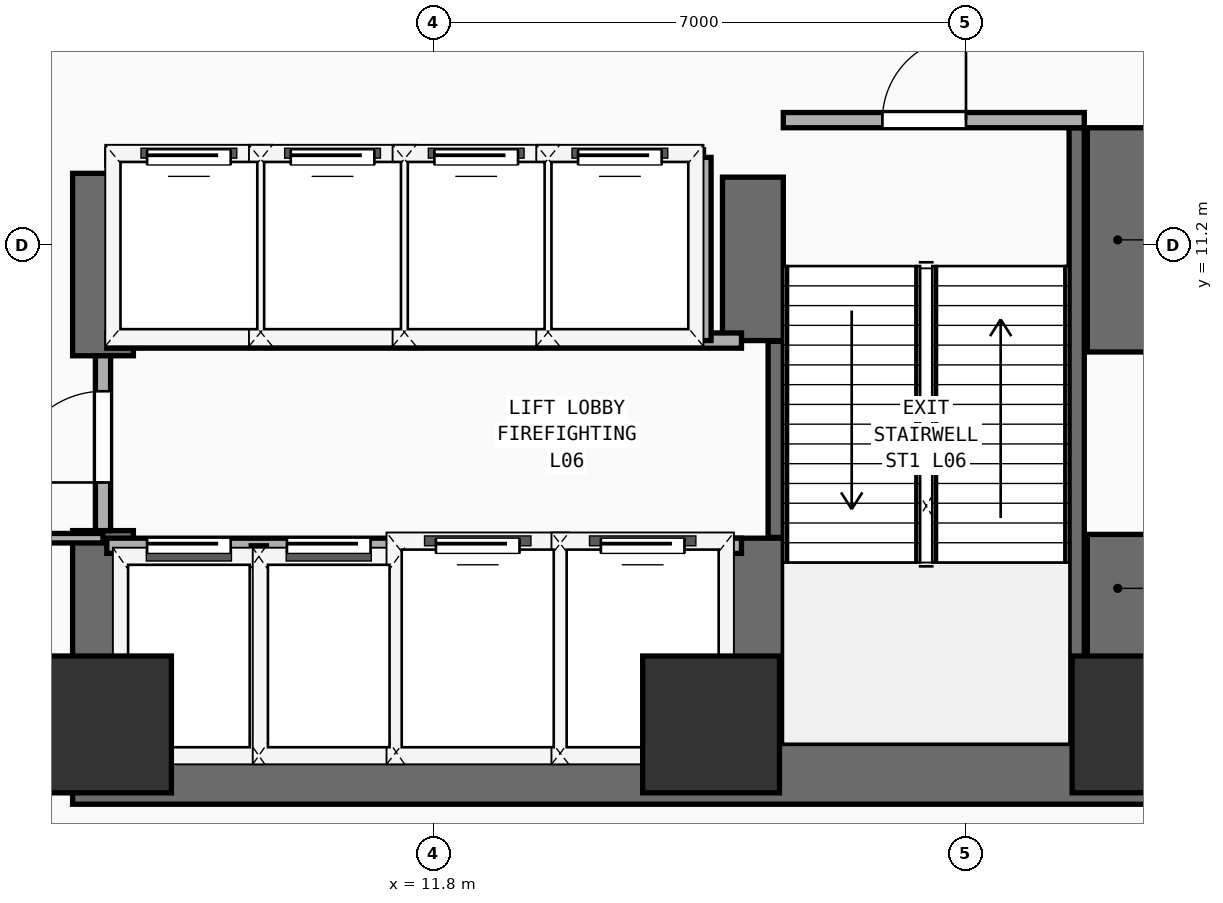
"""IFC4 building model, lengths in metres.
Left out: names, types, materials, properties, quantities, classifications, styles, units other than length and angle.
Written with IfcOpenShell. Run it as: python <this file> out.ifc"""

import sys

from ifc_helpers import new_model, si_unit, direction, frame, frame_2d, origin, origin_2d, place, context, subcontext, project, spatial, rectangle, extrude, element, fill, save


model = new_model("IFC4")
c1 = context("Model", 3, precision=1e-05, world=origin(), true_north=direction((0.0, 1.0)))
c2 = subcontext(c1, "Body", "Model", "MODEL_VIEW")
j1 = project(units=[si_unit("LENGTHUNIT", "METRE"), si_unit("PLANEANGLEUNIT", "RADIAN")], contexts=[c1])
p1 = place(None, origin())
s1 = spatial("IfcSite", under=j1, at=p1, CompositionType="ELEMENT")
p2 = place(p1, origin())
s2 = spatial("IfcBuilding", under=s1, at=p2, CompositionType="ELEMENT")
p3 = place(p2, frame((0.0, 0.0, 24.8)))
s3 = spatial("IfcBuildingStorey", under=s2, at=p3, CompositionType="ELEMENT", Elevation=24.8)
p4 = place(p3, frame((7.05, 4.25, 0.0), z_axis=(0.0, 0.0, 1.0), x_axis=(1.0, 0.0, 0.0)))
e1 = element("IfcWall", 1, at=p4, inside=s3, PredefinedType="SHEAR", context=c2, shape_type="SweptSolid", body=[
    extrude(rectangle(XDim=14.15, YDim=0.8, at=frame_2d((7.075, 0.0))), origin(), (0.0, 0.0, 1.0), 4.35),
])
p5 = place(p3, frame((7.45, 4.65, 0.0), z_axis=(0.0, 0.0, 1.0), x_axis=(0.0, 1.0, 0.0)))
e2 = element("IfcWall", 2, at=p5, inside=s3, PredefinedType="SHEAR", context=c2, shape_type="SweptSolid", body=[
    extrude(rectangle(XDim=2.8, YDim=0.8, at=frame_2d((1.4, 0.0))), origin(), (0.0, 0.0, 1.0), 4.35),
])
p6 = place(p3, frame((7.45, 9.75, 0.0), z_axis=(0.0, 0.0, 1.0), x_axis=(0.0, 1.0, 0.0)))
e3 = element("IfcWall", 3, at=p6, inside=s3, PredefinedType="SHEAR", context=c2, shape_type="SweptSolid", body=[
    extrude(rectangle(XDim=2.4, YDim=0.8, at=frame_2d((1.2, 0.0))), origin(), (0.0, 0.0, 1.0), 4.35),
])
p7 = place(p3, frame((20.8, 4.65, 0.0), z_axis=(0.0, 0.0, 1.0), x_axis=(0.0, 1.0, 0.0)))
e4 = element("IfcWall", 4, at=p7, inside=s3, PredefinedType="SHEAR", context=c2, shape_type="SweptSolid", body=[
    extrude(rectangle(XDim=2.75, YDim=0.8, at=frame_2d((1.375, 0.0))), origin(), (0.0, 0.0, 1.0), 4.35),
])
p8 = place(p3, frame((20.8, 9.8, 0.0), z_axis=(0.0, 0.0, 1.0), x_axis=(0.0, 1.0, 0.0)))
e5 = element("IfcWall", 5, at=p8, inside=s3, PredefinedType="SHEAR", context=c2, shape_type="SweptSolid", body=[
    extrude(rectangle(XDim=2.95, YDim=0.8, at=frame_2d((1.475, 0.0))), origin(), (0.0, 0.0, 1.0), 4.35),
])
p9 = place(p3, frame((16.0, 4.65, 0.0), z_axis=(0.0, 0.0, 1.0), x_axis=(0.0, 1.0, 0.0)))
e6 = element("IfcWall", 6, at=p9, inside=s3, PredefinedType="SHEAR", context=c2, shape_type="SweptSolid", body=[
    extrude(rectangle(XDim=2.7, YDim=0.8, at=frame_2d((1.35, 0.0))), origin(), (0.0, 0.0, 1.0), 4.35),
])
p10 = place(p3, frame((16.0, 9.95, 0.0), z_axis=(0.0, 0.0, 1.0), x_axis=(0.0, 1.0, 0.0)))
e7 = element("IfcWall", 7, at=p10, inside=s3, PredefinedType="SHEAR", context=c2, shape_type="SweptSolid", body=[
    extrude(rectangle(XDim=2.15, YDim=0.8, at=frame_2d((1.075, 0.0))), origin(), (0.0, 0.0, 1.0), 4.35),
])
for number, where, z_axis, x_axis in (
    (8, (7.45, 4.9, 0.0), (0.0, 0.0, 1.0), (1.0, 0.0, 0.0)),
    (9, (15.45, 4.9, 0.0), (0.0, 0.0, 1.0), (1.0, 0.0, 0.0)),
    (10, (21.1, 4.9, 0.0), (0.0, 0.0, 1.0), (1.0, 0.0, 0.0)),
):
    element("IfcColumn", number, at=place(p3, frame(where, z_axis=z_axis, x_axis=x_axis)), inside=s3, PredefinedType="COLUMN", context=c2, shape_type="SweptSolid", body=[
        extrude(rectangle(XDim=1.8, YDim=1.8, at=origin_2d()), origin(), (0.0, 0.0, 1.0), 4.35),
    ])
p11 = place(p3, frame((16.3, 7.36, 0.0), z_axis=(0.0, 0.0, 1.0), x_axis=(0.0, 1.0, 0.0)))
e11 = element("IfcWall", 11, at=p11, inside=s3, PredefinedType="SHEAR", context=c2, shape_type="SweptSolid", body=[
    extrude(rectangle(XDim=2.58, YDim=0.2, at=frame_2d((1.29, 0.0))), origin(), (0.0, 0.0, 1.0), 4.35),
])
p12 = place(p3, frame((20.26, 4.66, 0.0), z_axis=(0.0, 0.0, 1.0), x_axis=(0.0, 1.0, 0.0)))
e12 = element("IfcWall", 12, at=p12, inside=s3, PredefinedType="SHEAR", context=c2, shape_type="SweptSolid", body=[
    extrude(rectangle(XDim=8.09, YDim=0.2, at=frame_2d((4.045, 0.0))), origin(), (0.0, 0.0, 1.0), 4.35),
])
p13 = place(p3, frame((16.4, 12.85, 0.0), z_axis=(0.0, 0.0, 1.0), x_axis=(1.0, 0.0, 0.0)))
e13 = element("IfcWall", 13, at=p13, inside=s3, PredefinedType="PARTITIONING", context=c2, shape_type="SweptSolid", body=[
    extrude(rectangle(XDim=3.96, YDim=0.2, at=frame_2d((1.98, 0.0))), origin(), (0.0, 0.0, 1.0), 4.35),
])
p14 = place(p13, frame((1.304, 0.0, 0.0)))
e14 = element("IfcOpeningElement", 14, at=p14, cuts=e13, PredefinedType="OPENING", context=c2, shape_type="SweptSolid", body=[
    extrude(rectangle(XDim=1.1, YDim=2.2, at=frame_2d((0.55, 1.1))), frame((0.0, 0.11, 0.0), z_axis=(0.0, -1.0, 0.0), x_axis=(1.0, 0.0, 0.0)), (0.0, 0.0, 1.0), 0.22),
])
p15 = place(p3, frame((7.5, 7.25, 0.0), z_axis=(0.0, 0.0, 1.0), x_axis=(1.0, 0.0, 0.0)))
e15 = element("IfcWall", 15, at=p15, inside=s3, PredefinedType="PARTITIONING", context=c2, shape_type="SweptSolid", body=[
    extrude(rectangle(XDim=8.35, YDim=0.2, at=frame_2d((4.175, 0.0))), origin(), (0.0, 0.0, 1.0), 4.35),
])
p16 = place(p15, frame((0.53, 0.0, 0.0)))
e16 = element("IfcOpeningElement", 16, at=p16, cuts=e15, PredefinedType="OPENING", context=c2, shape_type="SweptSolid", body=[
    extrude(rectangle(XDim=1.1, YDim=2.2, at=frame_2d((0.55, 1.1))), frame((0.0, 0.11, 0.0), z_axis=(0.0, -1.0, 0.0), x_axis=(1.0, 0.0, 0.0)), (0.0, 0.0, 1.0), 0.22),
])
p17 = place(p15, frame((2.37, 0.0, 0.0)))
e17 = element("IfcOpeningElement", 17, at=p17, cuts=e15, PredefinedType="OPENING", context=c2, shape_type="SweptSolid", body=[
    extrude(rectangle(XDim=1.1, YDim=2.2, at=frame_2d((0.55, 1.1))), frame((0.0, 0.11, 0.0), z_axis=(0.0, -1.0, 0.0), x_axis=(1.0, 0.0, 0.0)), (0.0, 0.0, 1.0), 0.22),
])
p18 = place(p15, frame((4.33, 0.0, 0.0)))
e18 = element("IfcOpeningElement", 18, at=p18, cuts=e15, PredefinedType="OPENING", context=c2, shape_type="SweptSolid", body=[
    extrude(rectangle(XDim=1.1, YDim=2.2, at=frame_2d((0.55, 1.1))), frame((0.0, 0.11, 0.0), z_axis=(0.0, -1.0, 0.0), x_axis=(1.0, 0.0, 0.0)), (0.0, 0.0, 1.0), 0.22),
])
p19 = place(p15, frame((6.5, 0.0, 0.0)))
e19 = element("IfcOpeningElement", 19, at=p19, cuts=e15, PredefinedType="OPENING", context=c2, shape_type="SweptSolid", body=[
    extrude(rectangle(XDim=1.1, YDim=2.2, at=frame_2d((0.55, 1.1))), frame((0.0, 0.11, 0.0), z_axis=(0.0, -1.0, 0.0), x_axis=(1.0, 0.0, 0.0)), (0.0, 0.0, 1.0), 0.22),
])
p20 = place(p3, frame((7.5, 9.95, 0.0), z_axis=(0.0, 0.0, 1.0), x_axis=(1.0, 0.0, 0.0)))
e20 = element("IfcWall", 20, at=p20, inside=s3, PredefinedType="PARTITIONING", context=c2, shape_type="SweptSolid", body=[
    extrude(rectangle(XDim=8.35, YDim=0.2, at=frame_2d((4.175, 0.0))), origin(), (0.0, 0.0, 1.0), 4.35),
])
for number, where, z_axis, x_axis in (
    (21, (9.5, 4.45, 0.0), (0.0, 0.0, 1.0), (0.0, 1.0, 0.0)),
    (22, (11.36, 4.45, 0.0), (0.0, 0.0, 1.0), (0.0, 1.0, 0.0)),
    (23, (13.46, 4.45, 0.0), (0.0, 0.0, 1.0), (0.0, 1.0, 0.0)),
):
    element("IfcWall", number, at=place(p3, frame(where, z_axis=z_axis, x_axis=x_axis)), inside=s3, PredefinedType="PARTITIONING", context=c2, shape_type="SweptSolid", body=[
        extrude(rectangle(XDim=2.8, YDim=0.2, at=frame_2d((1.4, 0.0))), origin(), (0.0, 0.0, 1.0), 4.35),
    ])
p21 = place(p3, frame((7.45, 7.45, 0.0), z_axis=(0.0, 0.0, 1.0), x_axis=(0.0, 1.0, 0.0)))
e24 = element("IfcWall", 24, at=p21, inside=s3, PredefinedType="PARTITIONING", context=c2, shape_type="SweptSolid", body=[
    extrude(rectangle(XDim=2.3, YDim=0.2, at=frame_2d((1.15, 0.0))), origin(), (0.0, 0.0, 1.0), 3.13),
])
p22 = place(p21, frame((0.633, 0.0, 0.0)))
e25 = element("IfcOpeningElement", 25, at=p22, cuts=e24, PredefinedType="OPENING", context=c2, shape_type="SweptSolid", body=[
    extrude(rectangle(XDim=1.2, YDim=2.25, at=frame_2d((0.6, 1.125))), frame((0.0, 0.11, 0.0), z_axis=(0.0, -1.0, 0.0), x_axis=(1.0, 0.0, 0.0)), (0.0, 0.0, 1.0), 0.22),
])
p23 = place(p3, frame((7.5, 12.36, 0.0), z_axis=(0.0, 0.0, 1.0), x_axis=(1.0, 0.0, 0.0)))
e26 = element("IfcWall", 26, at=p23, inside=s3, PredefinedType="PARTITIONING", context=c2, shape_type="SweptSolid", body=[
    extrude(rectangle(XDim=7.85, YDim=0.2, at=frame_2d((3.925, 0.0))), origin(), (0.0, 0.0, 1.0), 4.35),
])
p24 = place(p23, frame((0.53, 0.0, 0.0)))
e27 = element("IfcOpeningElement", 27, at=p24, cuts=e26, PredefinedType="OPENING", context=c2, shape_type="SweptSolid", body=[
    extrude(rectangle(XDim=1.1, YDim=2.2, at=frame_2d((0.55, 1.1))), frame((0.0, 0.11, 0.0), z_axis=(0.0, -1.0, 0.0), x_axis=(1.0, 0.0, 0.0)), (0.0, 0.0, 1.0), 0.22),
])
p25 = place(p23, frame((2.42, 0.0, 0.0)))
e28 = element("IfcOpeningElement", 28, at=p25, cuts=e26, PredefinedType="OPENING", context=c2, shape_type="SweptSolid", body=[
    extrude(rectangle(XDim=1.1, YDim=2.2, at=frame_2d((0.55, 1.1))), frame((0.0, 0.11, 0.0), z_axis=(0.0, -1.0, 0.0), x_axis=(1.0, 0.0, 0.0)), (0.0, 0.0, 1.0), 0.22),
])
p26 = place(p23, frame((4.31, 0.0, 0.0)))
e29 = element("IfcOpeningElement", 29, at=p26, cuts=e26, PredefinedType="OPENING", context=c2, shape_type="SweptSolid", body=[
    extrude(rectangle(XDim=1.1, YDim=2.2, at=frame_2d((0.55, 1.1))), frame((0.0, 0.11, 0.0), z_axis=(0.0, -1.0, 0.0), x_axis=(1.0, 0.0, 0.0)), (0.0, 0.0, 1.0), 0.22),
])
p27 = place(p23, frame((6.2, 0.0, 0.0)))
e30 = element("IfcOpeningElement", 30, at=p27, cuts=e26, PredefinedType="OPENING", context=c2, shape_type="SweptSolid", body=[
    extrude(rectangle(XDim=1.1, YDim=2.2, at=frame_2d((0.55, 1.1))), frame((0.0, 0.11, 0.0), z_axis=(0.0, -1.0, 0.0), x_axis=(1.0, 0.0, 0.0)), (0.0, 0.0, 1.0), 0.22),
])
for number, where, z_axis, x_axis in (
    (31, (15.35, 9.95, 0.0), (0.0, 0.0, 1.0), (0.0, 1.0, 0.0)),
    (32, (9.52, 9.95, 0.0), (0.0, 0.0, 1.0), (0.0, 1.0, 0.0)),
    (33, (11.41, 9.95, 0.0), (0.0, 0.0, 1.0), (0.0, 1.0, 0.0)),
    (34, (13.3, 9.95, 0.0), (0.0, 0.0, 1.0), (0.0, 1.0, 0.0)),
):
    element("IfcWall", number, at=place(p3, frame(where, z_axis=z_axis, x_axis=x_axis)), inside=s3, PredefinedType="PARTITIONING", context=c2, shape_type="SweptSolid", body=[
        extrude(rectangle(XDim=2.41, YDim=0.2, at=frame_2d((1.205, 0.0))), origin(), (0.0, 0.0, 1.0), 4.35),
    ])
p28 = place(p3, frame((0.42, 7.35, 0.0), z_axis=(0.0, 0.0, 1.0), x_axis=(1.0, 0.0, 0.0)))
e35 = element("IfcWall", 35, at=p28, inside=s3, PredefinedType="PARTITIONING", context=c2, shape_type="SweptSolid", body=[
    extrude(rectangle(XDim=7.03, YDim=0.125, at=frame_2d((3.515, 0.0))), origin(), (0.0, 0.0, 1.0), 4.35),
])
p29 = place(p28, frame((4.78, 0.0, 0.0)))
e36 = element("IfcOpeningElement", 36, at=p29, cuts=e35, PredefinedType="OPENING", context=c2, shape_type="SweptSolid", body=[
    extrude(rectangle(XDim=0.95, YDim=2.15, at=frame_2d((0.475, 1.075))), frame((0.0, 0.073, 0.0), z_axis=(0.0, -1.0, 0.0), x_axis=(1.0, 0.0, 0.0)), (0.0, 0.0, 1.0), 0.145),
])
p30 = place(p14, frame((1.1, 0.0, 0.0), z_axis=(0.0, 0.0, 1.0), x_axis=(-1.0, 0.0, 0.0)))
e37 = element("IfcDoor", 37, at=p30, inside=s3, OperationType="SINGLE_SWING_LEFT", PredefinedType="DOOR", context=c2, shape_type="SweptSolid", body=[
    extrude(rectangle(XDim=1.1, YDim=2.2, at=frame_2d((0.55, 1.1))), frame((0.0, 0.025, 0.0), z_axis=(0.0, -1.0, 0.0), x_axis=(1.0, 0.0, 0.0)), (0.0, 0.0, 1.0), 0.05),
])
fill(e14, e37)
p31 = place(p16, origin())
e38 = element("IfcDoor", 38, at=p31, inside=s3, OperationType="SLIDING_TO_LEFT", PredefinedType="DOOR", context=c2, shape_type="SweptSolid", body=[
    extrude(rectangle(XDim=1.1, YDim=2.2, at=frame_2d((0.55, 1.1))), frame((0.0, 0.025, 0.0), z_axis=(0.0, -1.0, 0.0), x_axis=(1.0, 0.0, 0.0)), (0.0, 0.0, 1.0), 0.05),
])
fill(e16, e38)
p32 = place(p17, origin())
e39 = element("IfcDoor", 39, at=p32, inside=s3, OperationType="SLIDING_TO_LEFT", PredefinedType="DOOR", context=c2, shape_type="SweptSolid", body=[
    extrude(rectangle(XDim=1.1, YDim=2.2, at=frame_2d((0.55, 1.1))), frame((0.0, 0.025, 0.0), z_axis=(0.0, -1.0, 0.0), x_axis=(1.0, 0.0, 0.0)), (0.0, 0.0, 1.0), 0.05),
])
fill(e17, e39)
p33 = place(p18, origin())
e40 = element("IfcDoor", 40, at=p33, inside=s3, OperationType="SLIDING_TO_LEFT", PredefinedType="DOOR", context=c2, shape_type="SweptSolid", body=[
    extrude(rectangle(XDim=1.1, YDim=2.2, at=frame_2d((0.55, 1.1))), frame((0.0, 0.025, 0.0), z_axis=(0.0, -1.0, 0.0), x_axis=(1.0, 0.0, 0.0)), (0.0, 0.0, 1.0), 0.05),
])
fill(e18, e40)
p34 = place(p19, origin())
e41 = element("IfcDoor", 41, at=p34, inside=s3, OperationType="SLIDING_TO_LEFT", PredefinedType="DOOR", context=c2, shape_type="SweptSolid", body=[
    extrude(rectangle(XDim=1.1, YDim=2.2, at=frame_2d((0.55, 1.1))), frame((0.0, 0.025, 0.0), z_axis=(0.0, -1.0, 0.0), x_axis=(1.0, 0.0, 0.0)), (0.0, 0.0, 1.0), 0.05),
])
fill(e19, e41)
p35 = place(p22, frame((1.2, 0.0, 0.0), z_axis=(0.0, 0.0, 1.0), x_axis=(-1.0, 0.0, 0.0)))
e42 = element("IfcDoor", 42, at=p35, inside=s3, OperationType="SINGLE_SWING_RIGHT", PredefinedType="DOOR", context=c2, shape_type="SweptSolid", body=[
    extrude(rectangle(XDim=1.2, YDim=2.25, at=frame_2d((0.6, 1.125))), frame((0.0, 0.025, 0.0), z_axis=(0.0, -1.0, 0.0), x_axis=(1.0, 0.0, 0.0)), (0.0, 0.0, 1.0), 0.05),
])
fill(e25, e42)
p36 = place(p24, origin())
e43 = element("IfcDoor", 43, at=p36, inside=s3, OperationType="SLIDING_TO_LEFT", PredefinedType="DOOR", context=c2, shape_type="SweptSolid", body=[
    extrude(rectangle(XDim=1.1, YDim=2.2, at=frame_2d((0.55, 1.1))), frame((0.0, 0.025, 0.0), z_axis=(0.0, -1.0, 0.0), x_axis=(1.0, 0.0, 0.0)), (0.0, 0.0, 1.0), 0.05),
])
fill(e27, e43)
p37 = place(p25, origin())
e44 = element("IfcDoor", 44, at=p37, inside=s3, OperationType="SLIDING_TO_LEFT", PredefinedType="DOOR", context=c2, shape_type="SweptSolid", body=[
    extrude(rectangle(XDim=1.1, YDim=2.2, at=frame_2d((0.55, 1.1))), frame((0.0, 0.025, 0.0), z_axis=(0.0, -1.0, 0.0), x_axis=(1.0, 0.0, 0.0)), (0.0, 0.0, 1.0), 0.05),
])
fill(e28, e44)
p38 = place(p26, origin())
e45 = element("IfcDoor", 45, at=p38, inside=s3, OperationType="SLIDING_TO_LEFT", PredefinedType="DOOR", context=c2, shape_type="SweptSolid", body=[
    extrude(rectangle(XDim=1.1, YDim=2.2, at=frame_2d((0.55, 1.1))), frame((0.0, 0.025, 0.0), z_axis=(0.0, -1.0, 0.0), x_axis=(1.0, 0.0, 0.0)), (0.0, 0.0, 1.0), 0.05),
])
fill(e29, e45)
p39 = place(p27, origin())
e46 = element("IfcDoor", 46, at=p39, inside=s3, OperationType="SLIDING_TO_LEFT", PredefinedType="DOOR", context=c2, shape_type="SweptSolid", body=[
    extrude(rectangle(XDim=1.1, YDim=2.2, at=frame_2d((0.55, 1.1))), frame((0.0, 0.025, 0.0), z_axis=(0.0, -1.0, 0.0), x_axis=(1.0, 0.0, 0.0)), (0.0, 0.0, 1.0), 0.05),
])
fill(e30, e46)
save(model, sys.argv[1])
